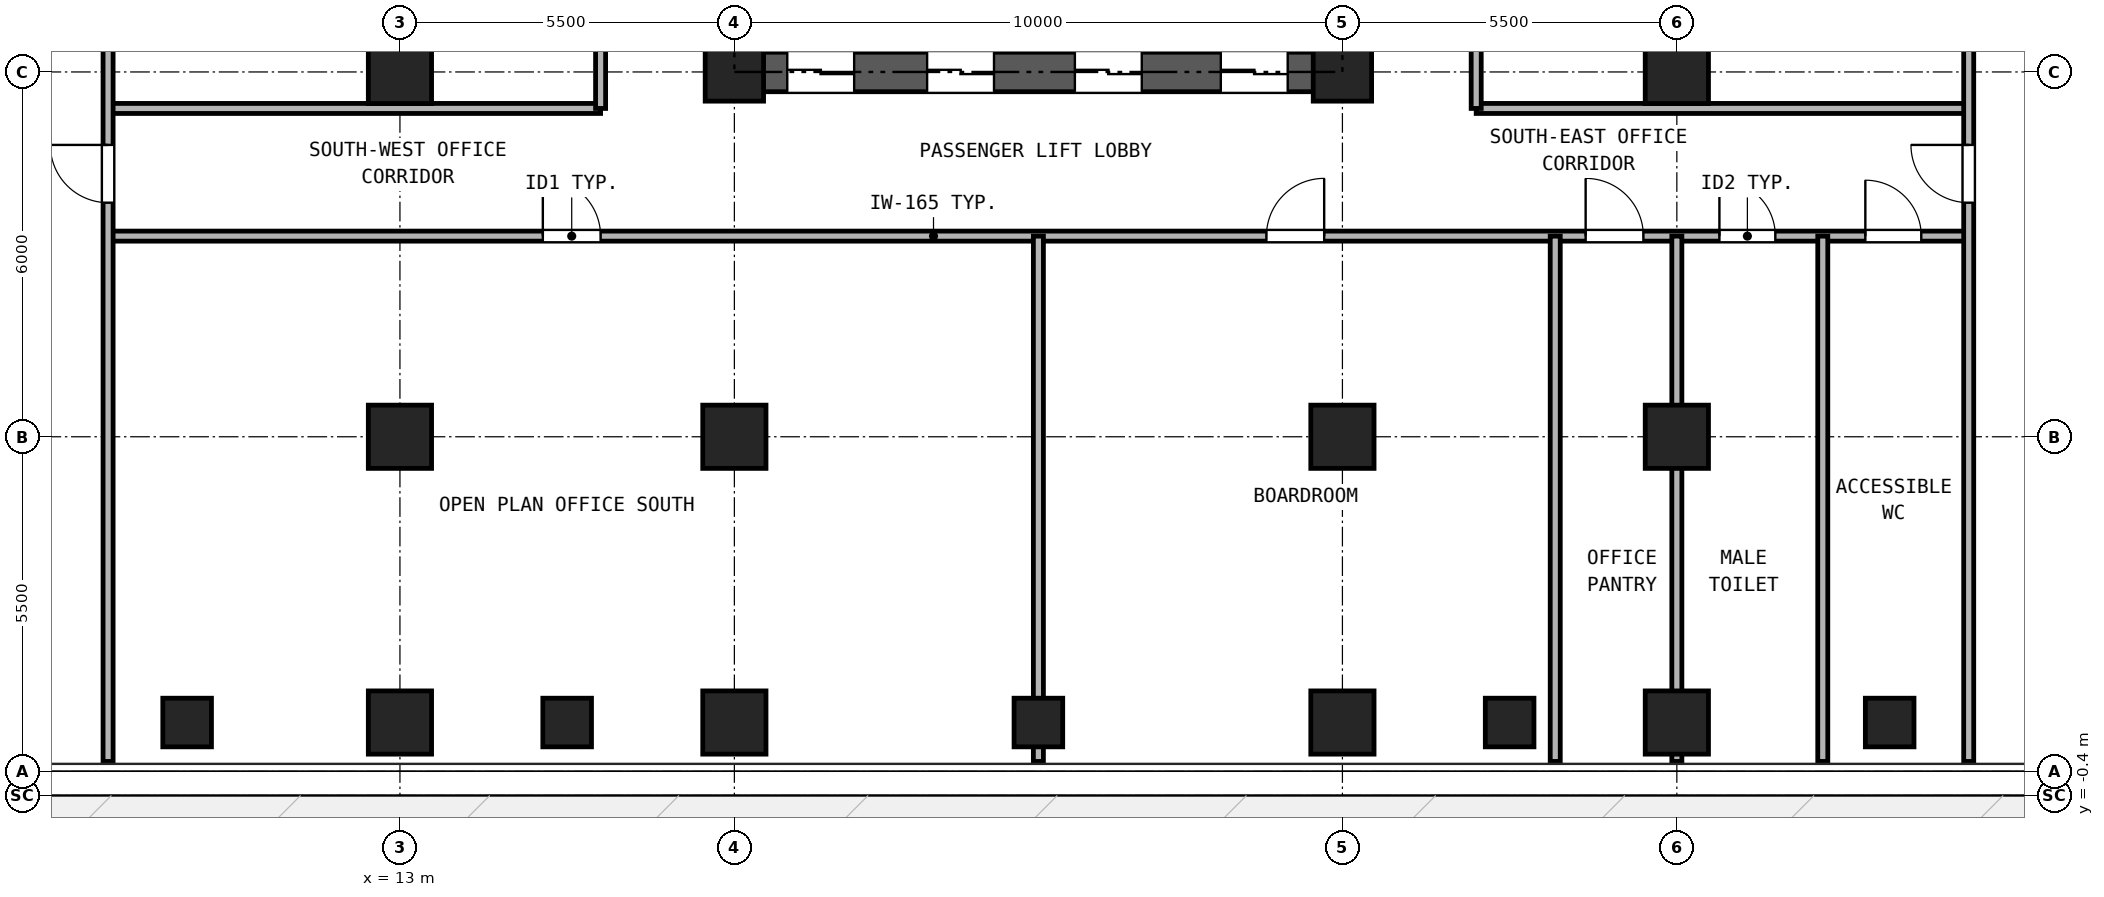
"""IFC4 building model, lengths in metres.
Left out: names, types, materials, properties, quantities, classifications, styles, units other than length and angle.
Written with IfcOpenShell. Run it as: python <this file> out.ifc"""

import sys

from ifc_helpers import new_model, si_unit, direction, frame, frame_2d, origin, origin_2d, place, context, subcontext, project, spatial, rectangle, hollow_rectangle, extrude, source, transform, mapped, element, fill, save


model = new_model("IFC4")
c1 = context("Model", 3, precision=1e-05, world=origin(), true_north=direction((0.0, 1.0)))
c2 = subcontext(c1, "Body", "Model", "MODEL_VIEW")
j1 = project(units=[si_unit("LENGTHUNIT", "METRE"), si_unit("PLANEANGLEUNIT", "RADIAN")], contexts=[c1])
p1 = place(None, origin())
s1 = spatial("IfcSite", under=j1, at=p1, CompositionType="ELEMENT")
p2 = place(p1, origin())
s2 = spatial("IfcBuilding", under=s1, at=p2, CompositionType="ELEMENT")
p3 = place(p2, frame((0.0, 0.0, 22.5)))
s3 = spatial("IfcBuildingStorey", under=s2, at=p3, CompositionType="ELEMENT", Elevation=22.5)
m1 = source(origin(), c2, "Body", "SweptSolid", [
    extrude(hollow_rectangle(XDim=1.04, YDim=1.04, WallThickness=0.065, at=origin_2d()), origin(), (0.0, 0.0, 1.0), 3.32),
])
for number, where, z_axis, x_axis in (
    (1, (13.0, 0.8, 0.0), (0.0, 0.0, 1.0), (1.0, 0.0, 0.0)),
    (2, (18.5, 0.8, 0.0), (0.0, 0.0, 1.0), (1.0, 0.0, 0.0)),
    (3, (28.5, 0.8, 0.0), (0.0, 0.0, 1.0), (1.0, 0.0, 0.0)),
    (4, (34.0, 0.8, 0.0), (0.0, 0.0, 1.0), (1.0, 0.0, 0.0)),
    (5, (13.0, 5.5, 0.0), (0.0, 0.0, 1.0), (1.0, 0.0, 0.0)),
    (6, (13.0, 11.5, 0.0), (0.0, 0.0, 1.0), (1.0, 0.0, 0.0)),
    (7, (18.5, 5.5, 0.0), (0.0, 0.0, 1.0), (1.0, 0.0, 0.0)),
):
    element("IfcColumn", number, at=place(p3, frame(where, z_axis=z_axis, x_axis=x_axis)), inside=s3, PredefinedType="COLUMN", context=c2, shape_type="MappedRepresentation", body=[
        mapped(m1, transform((0.0, 0.0, 0.0), x_axis=(1.0, 0.0, 0.0), y_axis=(0.0, 1.0, 0.0), z_axis=(0.0, 0.0, 1.0), scale=1.0)),
    ])
m2 = source(origin(), c2, "Body", "SweptSolid", [
    extrude(hollow_rectangle(XDim=0.96, YDim=0.96, WallThickness=0.06, at=origin_2d()), origin(), (0.0, 0.0, 1.0), 3.32),
])
p4 = place(p3, frame((18.5, 11.5, 0.0), z_axis=(0.0, 0.0, 1.0), x_axis=(1.0, 0.0, 0.0)))
e8 = element("IfcColumn", 8, at=p4, inside=s3, PredefinedType="COLUMN", context=c2, shape_type="MappedRepresentation", body=[
    mapped(m2, transform((0.0, 0.0, 0.0), x_axis=(1.0, 0.0, 0.0), y_axis=(0.0, 1.0, 0.0), z_axis=(0.0, 0.0, 1.0), scale=1.0)),
])
p5 = place(p3, frame((28.5, 5.5, 0.0), z_axis=(0.0, 0.0, 1.0), x_axis=(1.0, 0.0, 0.0)))
e9 = element("IfcColumn", 9, at=p5, inside=s3, PredefinedType="COLUMN", context=c2, shape_type="MappedRepresentation", body=[
    mapped(m1, transform((0.0, 0.0, 0.0), x_axis=(1.0, 0.0, 0.0), y_axis=(0.0, 1.0, 0.0), z_axis=(0.0, 0.0, 1.0), scale=1.0)),
])
p6 = place(p3, frame((28.5, 11.5, 0.0), z_axis=(0.0, 0.0, 1.0), x_axis=(1.0, 0.0, 0.0)))
e10 = element("IfcColumn", 10, at=p6, inside=s3, PredefinedType="COLUMN", context=c2, shape_type="MappedRepresentation", body=[
    mapped(m2, transform((0.0, 0.0, 0.0), x_axis=(1.0, 0.0, 0.0), y_axis=(0.0, 1.0, 0.0), z_axis=(0.0, 0.0, 1.0), scale=1.0)),
])
for number, where, z_axis, x_axis in (
    (11, (34.0, 5.5, 0.0), (0.0, 0.0, 1.0), (1.0, 0.0, 0.0)),
    (12, (34.0, 11.5, 0.0), (0.0, 0.0, 1.0), (1.0, 0.0, 0.0)),
):
    element("IfcColumn", number, at=place(p3, frame(where, z_axis=z_axis, x_axis=x_axis)), inside=s3, PredefinedType="COLUMN", context=c2, shape_type="MappedRepresentation", body=[
        mapped(m1, transform((0.0, 0.0, 0.0), x_axis=(1.0, 0.0, 0.0), y_axis=(0.0, 1.0, 0.0), z_axis=(0.0, 0.0, 1.0), scale=1.0)),
    ])
m3 = source(origin(), c2, "Body", "SweptSolid", [
    extrude(hollow_rectangle(XDim=0.8, YDim=0.8, WallThickness=0.045, at=origin_2d()), origin(), (0.0, 0.0, 1.0), 3.68),
])
for number, where, z_axis, x_axis in (
    (13, (9.5, 0.8, -0.36), (0.0, 0.0, 1.0), (1.0, 0.0, 0.0)),
    (14, (15.75, 0.8, -0.36), (0.0, 0.0, 1.0), (1.0, 0.0, 0.0)),
    (15, (23.5, 0.8, -0.36), (0.0, 0.0, 1.0), (1.0, 0.0, 0.0)),
    (16, (31.25, 0.8, -0.36), (0.0, 0.0, 1.0), (1.0, 0.0, 0.0)),
    (17, (37.5, 0.8, -0.36), (0.0, 0.0, 1.0), (1.0, 0.0, 0.0)),
):
    element("IfcColumn", number, at=place(p3, frame(where, z_axis=z_axis, x_axis=x_axis)), inside=s3, PredefinedType="COLUMN", context=c2, shape_type="MappedRepresentation", body=[
        mapped(m3, transform((0.0, 0.0, 0.0), x_axis=(1.0, 0.0, 0.0), y_axis=(0.0, 1.0, 0.0), z_axis=(0.0, 0.0, 1.0), scale=1.0)),
    ])
p7 = place(p3, frame((18.175, 11.5, 0.0), z_axis=(0.0, 0.0, 1.0), x_axis=(1.0, 0.0, 0.0)))
e18 = element("IfcWall", 18, at=p7, inside=s3, PredefinedType="SHEAR", context=c2, shape_type="SweptSolid", body=[
    extrude(rectangle(XDim=10.65, YDim=0.65, at=frame_2d((5.325, 0.0))), origin(), (0.0, 0.0, 1.0), 3.32),
])
p8 = place(p7, frame((1.195, 0.0, 0.0)))
e19 = element("IfcOpeningElement", 19, at=p8, cuts=e18, PredefinedType="OPENING", context=c2, shape_type="SweptSolid", body=[
    extrude(rectangle(XDim=1.1, YDim=2.25, at=frame_2d((0.55, 1.125))), frame((0.0, 0.335, 0.0), z_axis=(0.0, -1.0, 0.0), x_axis=(1.0, 0.0, 0.0)), (0.0, 0.0, 1.0), 0.67),
])
p9 = place(p7, frame((3.495, 0.0, 0.0)))
e20 = element("IfcOpeningElement", 20, at=p9, cuts=e18, PredefinedType="OPENING", context=c2, shape_type="SweptSolid", body=[
    extrude(rectangle(XDim=1.1, YDim=2.25, at=frame_2d((0.55, 1.125))), frame((0.0, 0.335, 0.0), z_axis=(0.0, -1.0, 0.0), x_axis=(1.0, 0.0, 0.0)), (0.0, 0.0, 1.0), 0.67),
])
p10 = place(p7, frame((5.925, 0.0, 0.0)))
e21 = element("IfcOpeningElement", 21, at=p10, cuts=e18, PredefinedType="OPENING", context=c2, shape_type="SweptSolid", body=[
    extrude(rectangle(XDim=1.1, YDim=2.25, at=frame_2d((0.55, 1.125))), frame((0.0, 0.335, 0.0), z_axis=(0.0, -1.0, 0.0), x_axis=(1.0, 0.0, 0.0)), (0.0, 0.0, 1.0), 0.67),
])
p11 = place(p7, frame((8.325, 0.0, 0.0)))
e22 = element("IfcOpeningElement", 22, at=p11, cuts=e18, PredefinedType="OPENING", context=c2, shape_type="SweptSolid", body=[
    extrude(rectangle(XDim=1.1, YDim=2.25, at=frame_2d((0.55, 1.125))), frame((0.0, 0.335, 0.0), z_axis=(0.0, -1.0, 0.0), x_axis=(1.0, 0.0, 0.0)), (0.0, 0.0, 1.0), 0.67),
])
p12 = place(p3, frame((8.2, 8.8, 0.0), z_axis=(0.0, 0.0, 1.0), x_axis=(1.0, 0.0, 0.0)))
e23 = element("IfcWall", 23, at=p12, inside=s3, PredefinedType="PARTITIONING", context=c2, shape_type="SweptSolid", body=[
    extrude(rectangle(XDim=30.6, YDim=0.165, at=frame_2d((15.3, 0.0))), origin(), (0.0, 0.0, 1.0), 3.32),
])
p13 = place(p12, frame((7.15, 0.0, 0.0)))
e24 = element("IfcOpeningElement", 24, at=p13, cuts=e23, PredefinedType="OPENING", context=c2, shape_type="SweptSolid", body=[
    extrude(rectangle(XDim=0.95, YDim=2.15, at=frame_2d((0.475, 1.075))), frame((0.0, 0.093, 0.0), z_axis=(0.0, -1.0, 0.0), x_axis=(1.0, 0.0, 0.0)), (0.0, 0.0, 1.0), 0.185),
])
p14 = place(p12, frame((19.05, 0.0, 0.0)))
e25 = element("IfcOpeningElement", 25, at=p14, cuts=e23, PredefinedType="OPENING", context=c2, shape_type="SweptSolid", body=[
    extrude(rectangle(XDim=0.95, YDim=2.15, at=frame_2d((0.475, 1.075))), frame((0.0, 0.093, 0.0), z_axis=(0.0, -1.0, 0.0), x_axis=(1.0, 0.0, 0.0)), (0.0, 0.0, 1.0), 0.185),
])
p15 = place(p12, frame((24.3, 0.0, 0.0)))
e26 = element("IfcOpeningElement", 26, at=p15, cuts=e23, PredefinedType="OPENING", context=c2, shape_type="SweptSolid", body=[
    extrude(rectangle(XDim=0.95, YDim=2.15, at=frame_2d((0.475, 1.075))), frame((0.0, 0.093, 0.0), z_axis=(0.0, -1.0, 0.0), x_axis=(1.0, 0.0, 0.0)), (0.0, 0.0, 1.0), 0.185),
])
p16 = place(p12, frame((26.5, 0.0, 0.0)))
e27 = element("IfcOpeningElement", 27, at=p16, cuts=e23, PredefinedType="OPENING", context=c2, shape_type="SweptSolid", body=[
    extrude(rectangle(XDim=0.92, YDim=2.1, at=frame_2d((0.46, 1.05))), frame((0.0, 0.093, 0.0), z_axis=(0.0, -1.0, 0.0), x_axis=(1.0, 0.0, 0.0)), (0.0, 0.0, 1.0), 0.185),
])
p17 = place(p12, frame((28.9, 0.0, 0.0)))
e28 = element("IfcOpeningElement", 28, at=p17, cuts=e23, PredefinedType="OPENING", context=c2, shape_type="SweptSolid", body=[
    extrude(rectangle(XDim=0.92, YDim=2.1, at=frame_2d((0.46, 1.05))), frame((0.0, 0.093, 0.0), z_axis=(0.0, -1.0, 0.0), x_axis=(1.0, 0.0, 0.0)), (0.0, 0.0, 1.0), 0.185),
])
for number, where, z_axis, x_axis in (
    (29, (8.2, 10.9, 0.0), (0.0, 0.0, 1.0), (1.0, 0.0, 0.0)),
    (30, (30.7, 10.9, 0.0), (0.0, 0.0, 1.0), (1.0, 0.0, 0.0)),
):
    element("IfcWall", number, at=place(p3, frame(where, z_axis=z_axis, x_axis=x_axis)), inside=s3, PredefinedType="PARTITIONING", context=c2, shape_type="SweptSolid", body=[
        extrude(rectangle(XDim=8.1, YDim=0.165, at=frame_2d((4.05, 0.0))), origin(), (0.0, 0.0, 1.0), 3.32),
    ])
p18 = place(p3, frame((16.3, 10.9, 0.0), z_axis=(0.0, 0.0, 1.0), x_axis=(0.0, 1.0, 0.0)))
e31 = element("IfcWall", 31, at=p18, inside=s3, PredefinedType="PARTITIONING", context=c2, shape_type="SweptSolid", body=[
    extrude(rectangle(XDim=18.35, YDim=0.165, at=frame_2d((9.175, 0.0))), origin(), (0.0, 0.0, 1.0), 3.32),
])
p19 = place(p18, frame((5.44, 0.0, 0.0)))
e32 = element("IfcOpeningElement", 32, at=p19, cuts=e31, PredefinedType="OPENING", context=c2, shape_type="SweptSolid", body=[
    extrude(rectangle(XDim=0.95, YDim=2.15, at=frame_2d((0.475, 1.075))), frame((0.0, 0.093, 0.0), z_axis=(0.0, -1.0, 0.0), x_axis=(1.0, 0.0, 0.0)), (0.0, 0.0, 1.0), 0.185),
])
p20 = place(p18, frame((14.616, 0.0, 0.0)))
e33 = element("IfcOpeningElement", 33, at=p20, cuts=e31, PredefinedType="OPENING", context=c2, shape_type="SweptSolid", body=[
    extrude(rectangle(XDim=0.95, YDim=2.15, at=frame_2d((0.475, 1.075))), frame((0.0, 0.093, 0.0), z_axis=(0.0, -1.0, 0.0), x_axis=(1.0, 0.0, 0.0)), (0.0, 0.0, 1.0), 0.185),
])
p21 = place(p3, frame((30.7, 10.9, 0.0), z_axis=(0.0, 0.0, 1.0), x_axis=(0.0, 1.0, 0.0)))
e34 = element("IfcWall", 34, at=p21, inside=s3, PredefinedType="PARTITIONING", context=c2, shape_type="SweptSolid", body=[
    extrude(rectangle(XDim=18.35, YDim=0.165, at=frame_2d((9.175, 0.0))), origin(), (0.0, 0.0, 1.0), 3.32),
])
p22 = place(p21, frame((8.675, 0.0, 0.0)))
e35 = element("IfcOpeningElement", 35, at=p22, cuts=e34, PredefinedType="OPENING", context=c2, shape_type="SweptSolid", body=[
    extrude(rectangle(XDim=0.95, YDim=2.15, at=frame_2d((0.475, 1.075))), frame((0.0, 0.093, 0.0), z_axis=(0.0, -1.0, 0.0), x_axis=(1.0, 0.0, 0.0)), (0.0, 0.0, 1.0), 0.185),
])
p23 = place(p3, frame((8.2, 0.16, 0.0), z_axis=(0.0, 0.0, 1.0), x_axis=(0.0, 1.0, 0.0)))
e36 = element("IfcWall", 36, at=p23, inside=s3, PredefinedType="PARTITIONING", context=c2, shape_type="SweptSolid", body=[
    extrude(rectangle(XDim=40.18, YDim=0.165, at=frame_2d((20.09, 0.0))), origin(), (0.0, 0.0, 1.0), 3.32),
])
p24 = place(p23, frame((9.19, 0.0, 0.0)))
e37 = element("IfcOpeningElement", 37, at=p24, cuts=e36, PredefinedType="OPENING", context=c2, shape_type="SweptSolid", body=[
    extrude(rectangle(XDim=0.95, YDim=2.15, at=frame_2d((0.475, 1.075))), frame((0.0, 0.093, 0.0), z_axis=(0.0, -1.0, 0.0), x_axis=(1.0, 0.0, 0.0)), (0.0, 0.0, 1.0), 0.185),
])
p25 = place(p23, frame((29.64, 0.0, 0.0)))
e38 = element("IfcOpeningElement", 38, at=p25, cuts=e36, PredefinedType="OPENING", context=c2, shape_type="SweptSolid", body=[
    extrude(rectangle(XDim=0.95, YDim=2.15, at=frame_2d((0.475, 1.075))), frame((0.0, 0.093, 0.0), z_axis=(0.0, -1.0, 0.0), x_axis=(1.0, 0.0, 0.0)), (0.0, 0.0, 1.0), 0.185),
])
p26 = place(p3, frame((38.8, 0.16, 0.0), z_axis=(0.0, 0.0, 1.0), x_axis=(0.0, 1.0, 0.0)))
e39 = element("IfcWall", 39, at=p26, inside=s3, PredefinedType="PARTITIONING", context=c2, shape_type="SweptSolid", body=[
    extrude(rectangle(XDim=40.18, YDim=0.165, at=frame_2d((20.09, 0.0))), origin(), (0.0, 0.0, 1.0), 3.32),
])
p27 = place(p26, frame((9.19, 0.0, 0.0)))
e40 = element("IfcOpeningElement", 40, at=p27, cuts=e39, PredefinedType="OPENING", context=c2, shape_type="SweptSolid", body=[
    extrude(rectangle(XDim=0.95, YDim=2.15, at=frame_2d((0.475, 1.075))), frame((0.0, 0.093, 0.0), z_axis=(0.0, -1.0, 0.0), x_axis=(1.0, 0.0, 0.0)), (0.0, 0.0, 1.0), 0.185),
])
p28 = place(p26, frame((29.64, 0.0, 0.0)))
e41 = element("IfcOpeningElement", 41, at=p28, cuts=e39, PredefinedType="OPENING", context=c2, shape_type="SweptSolid", body=[
    extrude(rectangle(XDim=0.95, YDim=2.15, at=frame_2d((0.475, 1.075))), frame((0.0, 0.093, 0.0), z_axis=(0.0, -1.0, 0.0), x_axis=(1.0, 0.0, 0.0)), (0.0, 0.0, 1.0), 0.185),
])
for number, where, z_axis, x_axis in (
    (42, (23.5, 0.16, 0.0), (0.0, 0.0, 1.0), (0.0, 1.0, 0.0)),
    (43, (32.0, 0.16, 0.0), (0.0, 0.0, 1.0), (0.0, 1.0, 0.0)),
):
    element("IfcWall", number, at=place(p3, frame(where, z_axis=z_axis, x_axis=x_axis)), inside=s3, PredefinedType="PARTITIONING", context=c2, shape_type="SweptSolid", body=[
        extrude(rectangle(XDim=8.64, YDim=0.165, at=frame_2d((4.32, 0.0))), origin(), (0.0, 0.0, 1.0), 3.32),
    ])
p29 = place(p3, frame((34.0, 0.16, 0.0), z_axis=(0.0, 0.0, 1.0), x_axis=(0.0, 1.0, 0.0)))
e44 = element("IfcWall", 44, at=p29, inside=s3, PredefinedType="PARTITIONING", context=c2, shape_type="SweptSolid", body=[
    extrude(rectangle(XDim=8.64, YDim=0.165, at=frame_2d((4.32, 0.0))), origin(), (0.0, 0.0, 1.0), 2.539),
])
p30 = place(p3, frame((36.4, 0.16, 0.0), z_axis=(0.0, 0.0, 1.0), x_axis=(0.0, 1.0, 0.0)))
e45 = element("IfcWall", 45, at=p30, inside=s3, PredefinedType="PARTITIONING", context=c2, shape_type="SweptSolid", body=[
    extrude(rectangle(XDim=8.64, YDim=0.165, at=frame_2d((4.32, 0.0))), origin(), (0.0, 0.0, 1.0), 3.32),
])
p31 = place(p8, frame((1.1, 0.0, 0.0), z_axis=(0.0, 0.0, 1.0), x_axis=(-1.0, 0.0, 0.0)))
e46 = element("IfcDoor", 46, at=p31, inside=s3, OperationType="DOUBLE_DOOR_SLIDING", PredefinedType="DOOR", context=c2, shape_type="SweptSolid", body=[
    extrude(rectangle(XDim=1.1, YDim=2.25, at=frame_2d((0.55, 1.125))), frame((0.0, 0.025, 0.0), z_axis=(0.0, -1.0, 0.0), x_axis=(1.0, 0.0, 0.0)), (0.0, 0.0, 1.0), 0.05),
])
fill(e19, e46)
p32 = place(p9, frame((1.1, 0.0, 0.0), z_axis=(0.0, 0.0, 1.0), x_axis=(-1.0, 0.0, 0.0)))
e47 = element("IfcDoor", 47, at=p32, inside=s3, OperationType="DOUBLE_DOOR_SLIDING", PredefinedType="DOOR", context=c2, shape_type="SweptSolid", body=[
    extrude(rectangle(XDim=1.1, YDim=2.25, at=frame_2d((0.55, 1.125))), frame((0.0, 0.025, 0.0), z_axis=(0.0, -1.0, 0.0), x_axis=(1.0, 0.0, 0.0)), (0.0, 0.0, 1.0), 0.05),
])
fill(e20, e47)
p33 = place(p10, frame((1.1, 0.0, 0.0), z_axis=(0.0, 0.0, 1.0), x_axis=(-1.0, 0.0, 0.0)))
e48 = element("IfcDoor", 48, at=p33, inside=s3, OperationType="DOUBLE_DOOR_SLIDING", PredefinedType="DOOR", context=c2, shape_type="SweptSolid", body=[
    extrude(rectangle(XDim=1.1, YDim=2.25, at=frame_2d((0.55, 1.125))), frame((0.0, 0.025, 0.0), z_axis=(0.0, -1.0, 0.0), x_axis=(1.0, 0.0, 0.0)), (0.0, 0.0, 1.0), 0.05),
])
fill(e21, e48)
p34 = place(p11, frame((1.1, 0.0, 0.0), z_axis=(0.0, 0.0, 1.0), x_axis=(-1.0, 0.0, 0.0)))
e49 = element("IfcDoor", 49, at=p34, inside=s3, OperationType="DOUBLE_DOOR_SLIDING", PredefinedType="DOOR", context=c2, shape_type="SweptSolid", body=[
    extrude(rectangle(XDim=1.1, YDim=2.25, at=frame_2d((0.55, 1.125))), frame((0.0, 0.025, 0.0), z_axis=(0.0, -1.0, 0.0), x_axis=(1.0, 0.0, 0.0)), (0.0, 0.0, 1.0), 0.05),
])
fill(e22, e49)
p35 = place(p13, frame((0.95, 0.0, 0.0), z_axis=(0.0, 0.0, 1.0), x_axis=(-1.0, 0.0, 0.0)))
e50 = element("IfcDoor", 50, at=p35, inside=s3, OperationType="SINGLE_SWING_LEFT", PredefinedType="DOOR", context=c2, shape_type="SweptSolid", body=[
    extrude(rectangle(XDim=0.95, YDim=2.15, at=frame_2d((0.475, 1.075))), frame((0.0, 0.025, 0.0), z_axis=(0.0, -1.0, 0.0), x_axis=(1.0, 0.0, 0.0)), (0.0, 0.0, 1.0), 0.05),
])
fill(e24, e50)
p36 = place(p14, frame((0.95, 0.0, 0.0), z_axis=(0.0, 0.0, 1.0), x_axis=(-1.0, 0.0, 0.0)))
e51 = element("IfcDoor", 51, at=p36, inside=s3, OperationType="SINGLE_SWING_RIGHT", PredefinedType="DOOR", context=c2, shape_type="SweptSolid", body=[
    extrude(rectangle(XDim=0.95, YDim=2.15, at=frame_2d((0.475, 1.075))), frame((0.0, 0.025, 0.0), z_axis=(0.0, -1.0, 0.0), x_axis=(1.0, 0.0, 0.0)), (0.0, 0.0, 1.0), 0.05),
])
fill(e25, e51)
p37 = place(p15, frame((0.95, 0.0, 0.0), z_axis=(0.0, 0.0, 1.0), x_axis=(-1.0, 0.0, 0.0)))
e52 = element("IfcDoor", 52, at=p37, inside=s3, OperationType="SINGLE_SWING_LEFT", PredefinedType="DOOR", context=c2, shape_type="SweptSolid", body=[
    extrude(rectangle(XDim=0.95, YDim=2.15, at=frame_2d((0.475, 1.075))), frame((0.0, 0.025, 0.0), z_axis=(0.0, -1.0, 0.0), x_axis=(1.0, 0.0, 0.0)), (0.0, 0.0, 1.0), 0.05),
])
fill(e26, e52)
p38 = place(p16, frame((0.92, 0.0, 0.0), z_axis=(0.0, 0.0, 1.0), x_axis=(-1.0, 0.0, 0.0)))
e53 = element("IfcDoor", 53, at=p38, inside=s3, OperationType="SINGLE_SWING_LEFT", PredefinedType="DOOR", context=c2, shape_type="SweptSolid", body=[
    extrude(rectangle(XDim=0.92, YDim=2.1, at=frame_2d((0.46, 1.05))), frame((0.0, 0.025, 0.0), z_axis=(0.0, -1.0, 0.0), x_axis=(1.0, 0.0, 0.0)), (0.0, 0.0, 1.0), 0.05),
])
fill(e27, e53)
p39 = place(p17, frame((0.92, 0.0, 0.0), z_axis=(0.0, 0.0, 1.0), x_axis=(-1.0, 0.0, 0.0)))
e54 = element("IfcDoor", 54, at=p39, inside=s3, OperationType="SINGLE_SWING_LEFT", PredefinedType="DOOR", context=c2, shape_type="SweptSolid", body=[
    extrude(rectangle(XDim=0.92, YDim=2.1, at=frame_2d((0.46, 1.05))), frame((0.0, 0.025, 0.0), z_axis=(0.0, -1.0, 0.0), x_axis=(1.0, 0.0, 0.0)), (0.0, 0.0, 1.0), 0.05),
])
fill(e28, e54)
p40 = place(p24, frame((0.95, 0.0, 0.0), z_axis=(0.0, 0.0, 1.0), x_axis=(-1.0, 0.0, 0.0)))
e55 = element("IfcDoor", 55, at=p40, inside=s3, OperationType="SINGLE_SWING_RIGHT", PredefinedType="DOOR", context=c2, shape_type="SweptSolid", body=[
    extrude(rectangle(XDim=0.95, YDim=2.15, at=frame_2d((0.475, 1.075))), frame((0.0, 0.025, 0.0), z_axis=(0.0, -1.0, 0.0), x_axis=(1.0, 0.0, 0.0)), (0.0, 0.0, 1.0), 0.05),
])
fill(e37, e55)
p41 = place(p27, origin())
e56 = element("IfcDoor", 56, at=p41, inside=s3, OperationType="SINGLE_SWING_RIGHT", PredefinedType="DOOR", context=c2, shape_type="SweptSolid", body=[
    extrude(rectangle(XDim=0.95, YDim=2.15, at=frame_2d((0.475, 1.075))), frame((0.0, 0.025, 0.0), z_axis=(0.0, -1.0, 0.0), x_axis=(1.0, 0.0, 0.0)), (0.0, 0.0, 1.0), 0.05),
])
fill(e40, e56)
save(model, sys.argv[1])
